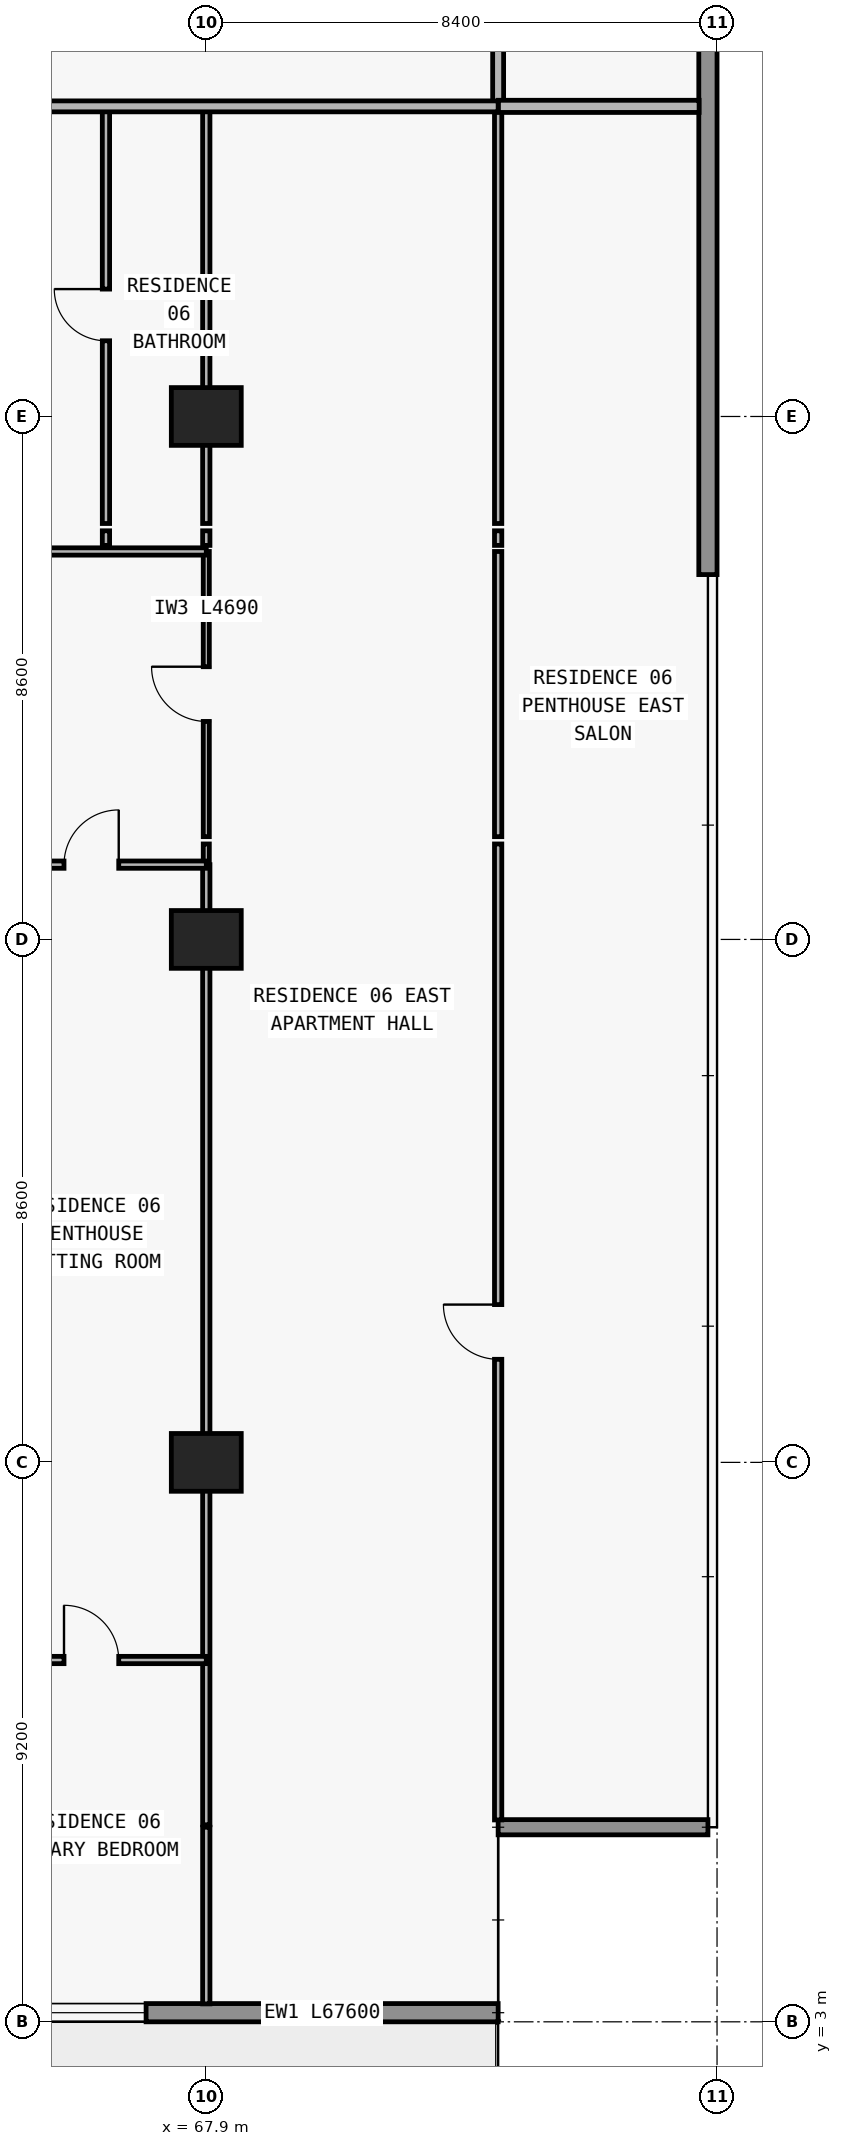
"""IFC4 building model, lengths in metres.
Left out: names, types, materials, properties, quantities, classifications, styles, units other than length and angle.
Written with IfcOpenShell. Run it as: python <this file> out.ifc"""

import sys

from ifc_helpers import new_model, si_unit, direction, frame, frame_2d, origin, origin_2d, place, context, subcontext, project, spatial, rectangle, extrude, element, fill, save


model = new_model("IFC4")
c1 = context("Model", 3, precision=1e-05, world=origin(), true_north=direction((0.0, 1.0)))
c2 = subcontext(c1, "Body", "Model", "MODEL_VIEW")
j1 = project(units=[si_unit("LENGTHUNIT", "METRE"), si_unit("PLANEANGLEUNIT", "RADIAN")], contexts=[c1])
p1 = place(None, origin())
s1 = spatial("IfcSite", under=j1, at=p1, CompositionType="ELEMENT")
p2 = place(p1, origin())
s2 = spatial("IfcBuilding", under=s1, at=p2, CompositionType="ELEMENT")
p3 = place(p2, frame((0.0, 0.0, 30.0)))
s3 = spatial("IfcBuildingStorey", under=s2, at=p3, CompositionType="ELEMENT", Elevation=30.0)
for number, where, z_axis, x_axis in (
    (1, (67.9, 12.2, 0.0), (0.0, 0.0, 1.0), (1.0, 0.0, 0.0)),
    (2, (67.9, 20.8, 0.0), (0.0, 0.0, 1.0), (1.0, 0.0, 0.0)),
    (3, (67.9, 29.4, 0.0), (0.0, 0.0, 1.0), (1.0, 0.0, 0.0)),
):
    element("IfcColumn", number, at=place(p3, frame(where, z_axis=z_axis, x_axis=x_axis)), inside=s3, PredefinedType="COLUMN", context=c2, shape_type="SweptSolid", body=[
        extrude(rectangle(XDim=1.15, YDim=0.95, at=origin_2d()), origin(), (0.0, 0.0, 1.0), 3.05),
    ])
p4 = place(p3, frame((72.7, 3.15, 0.0), z_axis=(0.0, 0.0, 1.0), x_axis=(-1.0, 0.0, 0.0)))
e4 = element("IfcWall", 4, at=p4, inside=s3, PredefinedType="STANDARD", context=c2, shape_type="SweptSolid", body=[
    extrude(rectangle(XDim=67.6, YDim=0.3, at=frame_2d((33.8, 0.0))), origin(), (0.0, 0.0, 1.0), 3.05),
])
p5 = place(p4, frame((59.826, 0.0, 0.0)))
e5 = element("IfcOpeningElement", 5, at=p5, cuts=e4, PredefinedType="OPENING", context=c2, shape_type="SweptSolid", body=[
    extrude(rectangle(XDim=2.0, YDim=2.3, at=frame_2d((1.0, 1.15))), frame((0.0, 0.16, 0.0), z_axis=(0.0, -1.0, 0.0), x_axis=(1.0, 0.0, 0.0)), (0.0, 0.0, 1.0), 0.32),
])
p6 = place(p4, frame((55.526, 0.0, 0.85)))
e6 = element("IfcOpeningElement", 6, at=p6, cuts=e4, PredefinedType="OPENING", context=c2, shape_type="SweptSolid", body=[
    extrude(rectangle(XDim=2.2, YDim=1.55, at=frame_2d((1.1, 0.775))), frame((0.0, 0.16, 0.0), z_axis=(0.0, -1.0, 0.0), x_axis=(1.0, 0.0, 0.0)), (0.0, 0.0, 1.0), 0.32),
])
p7 = place(p4, frame((51.09, 0.0, 0.0)))
e7 = element("IfcOpeningElement", 7, at=p7, cuts=e4, PredefinedType="OPENING", context=c2, shape_type="SweptSolid", body=[
    extrude(rectangle(XDim=2.0, YDim=2.3, at=frame_2d((1.0, 1.15))), frame((0.0, 0.16, 0.0), z_axis=(0.0, -1.0, 0.0), x_axis=(1.0, 0.0, 0.0)), (0.0, 0.0, 1.0), 0.32),
])
p8 = place(p4, frame((46.99, 0.0, 0.85)))
e8 = element("IfcOpeningElement", 8, at=p8, cuts=e4, PredefinedType="OPENING", context=c2, shape_type="SweptSolid", body=[
    extrude(rectangle(XDim=1.8, YDim=1.55, at=frame_2d((0.9, 0.775))), frame((0.0, 0.16, 0.0), z_axis=(0.0, -1.0, 0.0), x_axis=(1.0, 0.0, 0.0)), (0.0, 0.0, 1.0), 0.32),
])
p9 = place(p4, frame((43.026, 0.0, 0.0)))
e9 = element("IfcOpeningElement", 9, at=p9, cuts=e4, PredefinedType="OPENING", context=c2, shape_type="SweptSolid", body=[
    extrude(rectangle(XDim=2.0, YDim=2.3, at=frame_2d((1.0, 1.15))), frame((0.0, 0.16, 0.0), z_axis=(0.0, -1.0, 0.0), x_axis=(1.0, 0.0, 0.0)), (0.0, 0.0, 1.0), 0.32),
])
p10 = place(p4, frame((38.726, 0.0, 0.85)))
e10 = element("IfcOpeningElement", 10, at=p10, cuts=e4, PredefinedType="OPENING", context=c2, shape_type="SweptSolid", body=[
    extrude(rectangle(XDim=2.2, YDim=1.55, at=frame_2d((1.1, 0.775))), frame((0.0, 0.16, 0.0), z_axis=(0.0, -1.0, 0.0), x_axis=(1.0, 0.0, 0.0)), (0.0, 0.0, 1.0), 0.32),
])
p11 = place(p4, frame((34.69, 0.0, 0.0)))
e11 = element("IfcOpeningElement", 11, at=p11, cuts=e4, PredefinedType="OPENING", context=c2, shape_type="SweptSolid", body=[
    extrude(rectangle(XDim=2.0, YDim=2.3, at=frame_2d((1.0, 1.15))), frame((0.0, 0.16, 0.0), z_axis=(0.0, -1.0, 0.0), x_axis=(1.0, 0.0, 0.0)), (0.0, 0.0, 1.0), 0.32),
])
p12 = place(p4, frame((30.81, 0.0, 0.65)))
e12 = element("IfcOpeningElement", 12, at=p12, cuts=e4, PredefinedType="OPENING", context=c2, shape_type="SweptSolid", body=[
    extrude(rectangle(XDim=2.6, YDim=1.85, at=frame_2d((1.3, 0.925))), frame((0.0, 0.16, 0.0), z_axis=(0.0, -1.0, 0.0), x_axis=(1.0, 0.0, 0.0)), (0.0, 0.0, 1.0), 0.32),
])
p13 = place(p4, frame((24.7, 0.0, 0.85)))
e13 = element("IfcOpeningElement", 13, at=p13, cuts=e4, PredefinedType="OPENING", context=c2, shape_type="SweptSolid", body=[
    extrude(rectangle(XDim=2.2, YDim=1.55, at=frame_2d((1.1, 0.775))), frame((0.0, 0.16, 0.0), z_axis=(0.0, -1.0, 0.0), x_axis=(1.0, 0.0, 0.0)), (0.0, 0.0, 1.0), 0.32),
])
p14 = place(p4, frame((18.626, 0.0, 0.0)))
e14 = element("IfcOpeningElement", 14, at=p14, cuts=e4, PredefinedType="OPENING", context=c2, shape_type="SweptSolid", body=[
    extrude(rectangle(XDim=2.0, YDim=2.3, at=frame_2d((1.0, 1.15))), frame((0.0, 0.16, 0.0), z_axis=(0.0, -1.0, 0.0), x_axis=(1.0, 0.0, 0.0)), (0.0, 0.0, 1.0), 0.32),
])
p15 = place(p4, frame((14.326, 0.0, 0.85)))
e15 = element("IfcOpeningElement", 15, at=p15, cuts=e4, PredefinedType="OPENING", context=c2, shape_type="SweptSolid", body=[
    extrude(rectangle(XDim=2.2, YDim=1.55, at=frame_2d((1.1, 0.775))), frame((0.0, 0.16, 0.0), z_axis=(0.0, -1.0, 0.0), x_axis=(1.0, 0.0, 0.0)), (0.0, 0.0, 1.0), 0.32),
])
p16 = place(p4, frame((9.89, 0.0, 0.0)))
e16 = element("IfcOpeningElement", 16, at=p16, cuts=e4, PredefinedType="OPENING", context=c2, shape_type="SweptSolid", body=[
    extrude(rectangle(XDim=2.0, YDim=2.3, at=frame_2d((1.0, 1.15))), frame((0.0, 0.16, 0.0), z_axis=(0.0, -1.0, 0.0), x_axis=(1.0, 0.0, 0.0)), (0.0, 0.0, 1.0), 0.32),
])
p17 = place(p4, frame((5.79, 0.0, 0.85)))
e17 = element("IfcOpeningElement", 17, at=p17, cuts=e4, PredefinedType="OPENING", context=c2, shape_type="SweptSolid", body=[
    extrude(rectangle(XDim=1.8, YDim=1.55, at=frame_2d((0.9, 0.775))), frame((0.0, 0.16, 0.0), z_axis=(0.0, -1.0, 0.0), x_axis=(1.0, 0.0, 0.0)), (0.0, 0.0, 1.0), 0.32),
])
p18 = place(p3, frame((72.7, 6.2, 0.0), z_axis=(0.0, 0.0, 1.0), x_axis=(1.0, 0.0, 0.0)))
e18 = element("IfcWall", 18, at=p18, inside=s3, PredefinedType="ELEMENTEDWALL", context=c2, shape_type="SweptSolid", body=[
    extrude(rectangle(XDim=3.45, YDim=0.25, at=frame_2d((1.725, 0.0))), origin(), (0.0, 0.0, 1.0), 3.05),
])
p19 = place(p3, frame((76.15, 47.4, 0.0), z_axis=(0.0, 0.0, 1.0), x_axis=(0.0, -1.0, 0.0)))
e19 = element("IfcWall", 19, at=p19, inside=s3, PredefinedType="STANDARD", context=c2, shape_type="SweptSolid", body=[
    extrude(rectangle(XDim=20.6, YDim=0.3, at=frame_2d((10.3, 0.0))), origin(), (0.0, 0.0, 1.0), 3.05),
])
p20 = place(p3, frame((66.25, 27.28, 0.0), z_axis=(0.0, 0.0, 1.0), x_axis=(0.0, 1.0, 0.0)))
e20 = element("IfcWall", 20, at=p20, inside=s3, PredefinedType="PARTITIONING", context=c2, shape_type="SweptSolid", body=[
    extrude(rectangle(XDim=0.24, YDim=0.12, at=frame_2d((0.12, 0.0))), origin(), (0.0, 0.0, 1.0), 3.05),
])
p21 = place(p3, frame((66.25, 27.64, 0.0), z_axis=(0.0, 0.0, 1.0), x_axis=(0.0, 1.0, 0.0)))
e21 = element("IfcWall", 21, at=p21, inside=s3, PredefinedType="PARTITIONING", context=c2, shape_type="SweptSolid", body=[
    extrude(rectangle(XDim=6.86, YDim=0.12, at=frame_2d((3.43, 0.0))), origin(), (0.0, 0.0, 1.0), 3.05),
])
p22 = place(p21, frame((3.005, 0.0, 0.0)))
e22 = element("IfcOpeningElement", 22, at=p22, cuts=e21, PredefinedType="OPENING", context=c2, shape_type="SweptSolid", body=[
    extrude(rectangle(XDim=0.85, YDim=2.1, at=frame_2d((0.425, 1.05))), frame((0.0, 0.07, 0.0), z_axis=(0.0, -1.0, 0.0), x_axis=(1.0, 0.0, 0.0)), (0.0, 0.0, 1.0), 0.14),
])
p23 = place(p3, frame((67.9, 3.295, 0.0), z_axis=(0.0, 0.0, 1.0), x_axis=(0.0, 1.0, 0.0)))
e23 = element("IfcWall", 23, at=p23, inside=s3, PredefinedType="PARTITIONING", context=c2, shape_type="SweptSolid", body=[
    extrude(rectangle(XDim=2.905, YDim=0.12, at=frame_2d((1.453, 0.0))), origin(), (0.0, 0.0, 1.0), 3.05),
])
p24 = place(p3, frame((67.9, 6.24, 0.0), z_axis=(0.0, 0.0, 1.0), x_axis=(0.0, 1.0, 0.0)))
e24 = element("IfcWall", 24, at=p24, inside=s3, PredefinedType="PARTITIONING", context=c2, shape_type="SweptSolid", body=[
    extrude(rectangle(XDim=15.79, YDim=0.12, at=frame_2d((7.895, 0.0))), origin(), (0.0, 0.0, 1.0), 2.11),
])
p25 = place(p3, frame((67.9, 22.035, 0.0), z_axis=(0.0, 0.0, 1.0), x_axis=(0.0, 1.0, 0.0)))
e25 = element("IfcWall", 25, at=p25, inside=s3, PredefinedType="MOVABLE", context=c2, shape_type="SweptSolid", body=[
    extrude(rectangle(XDim=0.335, YDim=0.1, at=frame_2d((0.167, 0.0))), origin(), (0.0, 0.0, 1.0), 2.11),
])
p26 = place(p3, frame((67.9, 22.49, 0.0), z_axis=(0.0, 0.0, 1.0), x_axis=(0.0, 1.0, 0.0)))
e26 = element("IfcWall", 26, at=p26, inside=s3, PredefinedType="MOVABLE", context=c2, shape_type="SweptSolid", body=[
    extrude(rectangle(XDim=4.69, YDim=0.1, at=frame_2d((2.345, 0.0))), origin(), (0.0, 0.0, 1.0), 2.11),
])
p27 = place(p26, frame((1.895, 0.0, 0.0)))
e27 = element("IfcOpeningElement", 27, at=p27, cuts=e26, PredefinedType="OPENING", context=c2, shape_type="SweptSolid", body=[
    extrude(rectangle(XDim=0.9, YDim=2.06, at=frame_2d((0.45, 1.03))), frame((0.0, 0.06, 0.0), z_axis=(0.0, -1.0, 0.0), x_axis=(1.0, 0.0, 0.0)), (0.0, 0.0, 1.0), 0.12),
])
p28 = place(p3, frame((67.9, 27.28, 0.0), z_axis=(0.0, 0.0, 1.0), x_axis=(0.0, 1.0, 0.0)))
e28 = element("IfcWall", 28, at=p28, inside=s3, PredefinedType="PARTITIONING", context=c2, shape_type="SweptSolid", body=[
    extrude(rectangle(XDim=0.24, YDim=0.12, at=frame_2d((0.12, 0.0))), origin(), (0.0, 0.0, 1.0), 2.11),
])
p29 = place(p3, frame((67.9, 27.64, 0.0), z_axis=(0.0, 0.0, 1.0), x_axis=(0.0, 1.0, 0.0)))
e29 = element("IfcWall", 29, at=p29, inside=s3, PredefinedType="PARTITIONING", context=c2, shape_type="SweptSolid", body=[
    extrude(rectangle(XDim=6.86, YDim=0.12, at=frame_2d((3.43, 0.0))), origin(), (0.0, 0.0, 1.0), 2.11),
])
p30 = place(p3, frame((72.7, 6.32, 0.0), z_axis=(0.0, 0.0, 1.0), x_axis=(0.0, 1.0, 0.0)))
e30 = element("IfcWall", 30, at=p30, inside=s3, PredefinedType="PARTITIONING", context=c2, shape_type="SweptSolid", body=[
    extrude(rectangle(XDim=16.05, YDim=0.12, at=frame_2d((8.025, 0.0))), origin(), (0.0, 0.0, 1.0), 3.05),
])
p31 = place(p30, frame((7.575, 0.0, 0.0)))
e31 = element("IfcOpeningElement", 31, at=p31, cuts=e30, PredefinedType="OPENING", context=c2, shape_type="SweptSolid", body=[
    extrude(rectangle(XDim=0.9, YDim=2.15, at=frame_2d((0.45, 1.075))), frame((0.0, 0.07, 0.0), z_axis=(0.0, -1.0, 0.0), x_axis=(1.0, 0.0, 0.0)), (0.0, 0.0, 1.0), 0.14),
])
p32 = place(p3, frame((72.7, 22.49, 0.0), z_axis=(0.0, 0.0, 1.0), x_axis=(0.0, 1.0, 0.0)))
e32 = element("IfcWall", 32, at=p32, inside=s3, PredefinedType="PARTITIONING", context=c2, shape_type="SweptSolid", body=[
    extrude(rectangle(XDim=4.69, YDim=0.12, at=frame_2d((2.345, 0.0))), origin(), (0.0, 0.0, 1.0), 3.05),
])
p33 = place(p3, frame((72.7, 27.28, 0.0), z_axis=(0.0, 0.0, 1.0), x_axis=(0.0, 1.0, 0.0)))
e33 = element("IfcWall", 33, at=p33, inside=s3, PredefinedType="PARTITIONING", context=c2, shape_type="SweptSolid", body=[
    extrude(rectangle(XDim=0.24, YDim=0.12, at=frame_2d((0.12, 0.0))), origin(), (0.0, 0.0, 1.0), 3.05),
])
p34 = place(p3, frame((72.7, 27.64, 0.0), z_axis=(0.0, 0.0, 1.0), x_axis=(0.0, 1.0, 0.0)))
e34 = element("IfcWall", 34, at=p34, inside=s3, PredefinedType="PARTITIONING", context=c2, shape_type="SweptSolid", body=[
    extrude(rectangle(XDim=6.86, YDim=0.12, at=frame_2d((3.43, 0.0))), origin(), (0.0, 0.0, 1.0), 3.05),
])
p35 = place(p3, frame((72.7, 34.505, 0.0), z_axis=(0.0, 0.0, 1.0), x_axis=(0.0, 1.0, 0.0)))
e35 = element("IfcWall", 35, at=p35, inside=s3, PredefinedType="PARTITIONING", context=c2, shape_type="SweptSolid", body=[
    extrude(rectangle(XDim=2.395, YDim=0.18, at=frame_2d((1.198, 0.0))), origin(), (0.0, 0.0, 1.0), 3.05),
])
p36 = place(p3, frame((64.12, 8.95, 0.0), z_axis=(0.0, 0.0, 1.0), x_axis=(1.0, 0.0, 0.0)))
e36 = element("IfcWall", 36, at=p36, inside=s3, PredefinedType="PARTITIONING", context=c2, shape_type="SweptSolid", body=[
    extrude(rectangle(XDim=3.78, YDim=0.12, at=frame_2d((1.89, 0.0))), origin(), (0.0, 0.0, 1.0), 3.05),
])
p37 = place(p36, frame((1.44, 0.0, 0.0)))
e37 = element("IfcOpeningElement", 37, at=p37, cuts=e36, PredefinedType="OPENING", context=c2, shape_type="SweptSolid", body=[
    extrude(rectangle(XDim=0.9, YDim=2.15, at=frame_2d((0.45, 1.075))), frame((0.0, 0.07, 0.0), z_axis=(0.0, -1.0, 0.0), x_axis=(1.0, 0.0, 0.0)), (0.0, 0.0, 1.0), 0.14),
])
p38 = place(p3, frame((59.5, 22.03, 0.0), z_axis=(0.0, 0.0, 1.0), x_axis=(1.0, 0.0, 0.0)))
e38 = element("IfcWall", 38, at=p38, inside=s3, PredefinedType="PARTITIONING", context=c2, shape_type="SweptSolid", body=[
    extrude(rectangle(XDim=8.4, YDim=0.12, at=frame_2d((4.2, 0.0))), origin(), (0.0, 0.0, 1.0), 3.05),
])
p39 = place(p38, frame((1.693, 0.0, 0.0)))
e39 = element("IfcOpeningElement", 39, at=p39, cuts=e38, PredefinedType="OPENING", context=c2, shape_type="SweptSolid", body=[
    extrude(rectangle(XDim=0.9, YDim=2.15, at=frame_2d((0.45, 1.075))), frame((0.0, 0.07, 0.0), z_axis=(0.0, -1.0, 0.0), x_axis=(1.0, 0.0, 0.0)), (0.0, 0.0, 1.0), 0.14),
])
p40 = place(p38, frame((6.06, 0.0, 0.0)))
e40 = element("IfcOpeningElement", 40, at=p40, cuts=e38, PredefinedType="OPENING", context=c2, shape_type="SweptSolid", body=[
    extrude(rectangle(XDim=0.9, YDim=2.15, at=frame_2d((0.45, 1.075))), frame((0.0, 0.07, 0.0), z_axis=(0.0, -1.0, 0.0), x_axis=(1.0, 0.0, 0.0)), (0.0, 0.0, 1.0), 0.14),
])
p41 = place(p3, frame((59.5, 27.18, 0.0), z_axis=(0.0, 0.0, 1.0), x_axis=(1.0, 0.0, 0.0)))
e41 = element("IfcWall", 41, at=p41, inside=s3, PredefinedType="PARTITIONING", context=c2, shape_type="SweptSolid", body=[
    extrude(rectangle(XDim=8.4, YDim=0.12, at=frame_2d((4.2, 0.0))), origin(), (0.0, 0.0, 1.0), 3.05),
])
p42 = place(p41, frame((1.693, 0.0, 0.0)))
e42 = element("IfcOpeningElement", 42, at=p42, cuts=e41, PredefinedType="OPENING", context=c2, shape_type="SweptSolid", body=[
    extrude(rectangle(XDim=0.9, YDim=2.15, at=frame_2d((0.45, 1.075))), frame((0.0, 0.07, 0.0), z_axis=(0.0, -1.0, 0.0), x_axis=(1.0, 0.0, 0.0)), (0.0, 0.0, 1.0), 0.14),
])
p43 = place(p3, frame((55.9, 34.5, 0.0), z_axis=(0.0, 0.0, 1.0), x_axis=(1.0, 0.0, 0.0)))
e43 = element("IfcWall", 43, at=p43, inside=s3, PredefinedType="PARTITIONING", context=c2, shape_type="SweptSolid", body=[
    extrude(rectangle(XDim=16.8, YDim=0.18, at=frame_2d((8.4, 0.0))), origin(), (0.0, 0.0, 1.0), 3.05),
])
p44 = place(p43, frame((6.475, 0.0, 0.0)))
e44 = element("IfcOpeningElement", 44, at=p44, cuts=e43, PredefinedType="OPENING", context=c2, shape_type="SweptSolid", body=[
    extrude(rectangle(XDim=1.0, YDim=2.2, at=frame_2d((0.5, 1.1))), frame((0.0, 0.1, 0.0), z_axis=(0.0, -1.0, 0.0), x_axis=(1.0, 0.0, 0.0)), (0.0, 0.0, 1.0), 0.2),
])
p45 = place(p3, frame((72.705, 34.5, 0.0), z_axis=(0.0, 0.0, 1.0), x_axis=(1.0, 0.0, 0.0)))
e45 = element("IfcWall", 45, at=p45, inside=s3, PredefinedType="PARTITIONING", context=c2, shape_type="SweptSolid", body=[
    extrude(rectangle(XDim=3.3, YDim=0.2, at=frame_2d((1.65, 0.0))), origin(), (0.0, 0.0, 1.0), 3.05),
])
p46 = place(p17, origin())
e46 = element("IfcWindow", 46, at=p46, inside=s3, PartitioningType="SINGLE_PANEL", PredefinedType="WINDOW", context=c2, shape_type="SweptSolid", body=[
    extrude(rectangle(XDim=1.8, YDim=1.55, at=frame_2d((0.9, 0.775))), frame((0.0, 0.03, 0.0), z_axis=(0.0, -1.0, 0.0), x_axis=(1.0, 0.0, 0.0)), (0.0, 0.0, 1.0), 0.06),
])
fill(e17, e46)
p47 = place(p22, origin())
e47 = element("IfcDoor", 47, at=p47, inside=s3, OperationType="SINGLE_SWING_RIGHT", PredefinedType="DOOR", context=c2, shape_type="SweptSolid", body=[
    extrude(rectangle(XDim=0.85, YDim=2.1, at=frame_2d((0.425, 1.05))), frame((0.0, 0.025, 0.0), z_axis=(0.0, -1.0, 0.0), x_axis=(1.0, 0.0, 0.0)), (0.0, 0.0, 1.0), 0.05),
])
fill(e22, e47)
p48 = place(p40, origin())
e48 = element("IfcDoor", 48, at=p48, inside=s3, OperationType="SINGLE_SWING_RIGHT", PredefinedType="DOOR", context=c2, shape_type="SweptSolid", body=[
    extrude(rectangle(XDim=0.9, YDim=2.15, at=frame_2d((0.45, 1.075))), frame((0.0, 0.025, 0.0), z_axis=(0.0, -1.0, 0.0), x_axis=(1.0, 0.0, 0.0)), (0.0, 0.0, 1.0), 0.05),
])
fill(e40, e48)
p49 = place(p37, origin())
e49 = element("IfcDoor", 49, at=p49, inside=s3, OperationType="SINGLE_SWING_LEFT", PredefinedType="DOOR", context=c2, shape_type="SweptSolid", body=[
    extrude(rectangle(XDim=0.9, YDim=2.15, at=frame_2d((0.45, 1.075))), frame((0.0, 0.025, 0.0), z_axis=(0.0, -1.0, 0.0), x_axis=(1.0, 0.0, 0.0)), (0.0, 0.0, 1.0), 0.05),
])
fill(e37, e49)
p50 = place(p27, origin())
e50 = element("IfcDoor", 50, at=p50, inside=s3, OperationType="SINGLE_SWING_RIGHT", PredefinedType="DOOR", context=c2, shape_type="SweptSolid", body=[
    extrude(rectangle(XDim=0.9, YDim=2.06, at=frame_2d((0.45, 1.03))), frame((0.0, 0.025, 0.0), z_axis=(0.0, -1.0, 0.0), x_axis=(1.0, 0.0, 0.0)), (0.0, 0.0, 1.0), 0.05),
])
fill(e27, e50)
p51 = place(p31, origin())
e51 = element("IfcDoor", 51, at=p51, inside=s3, OperationType="SINGLE_SWING_RIGHT", PredefinedType="DOOR", context=c2, shape_type="SweptSolid", body=[
    extrude(rectangle(XDim=0.9, YDim=2.15, at=frame_2d((0.45, 1.075))), frame((0.0, 0.025, 0.0), z_axis=(0.0, -1.0, 0.0), x_axis=(1.0, 0.0, 0.0)), (0.0, 0.0, 1.0), 0.05),
])
fill(e31, e51)
save(model, sys.argv[1])
